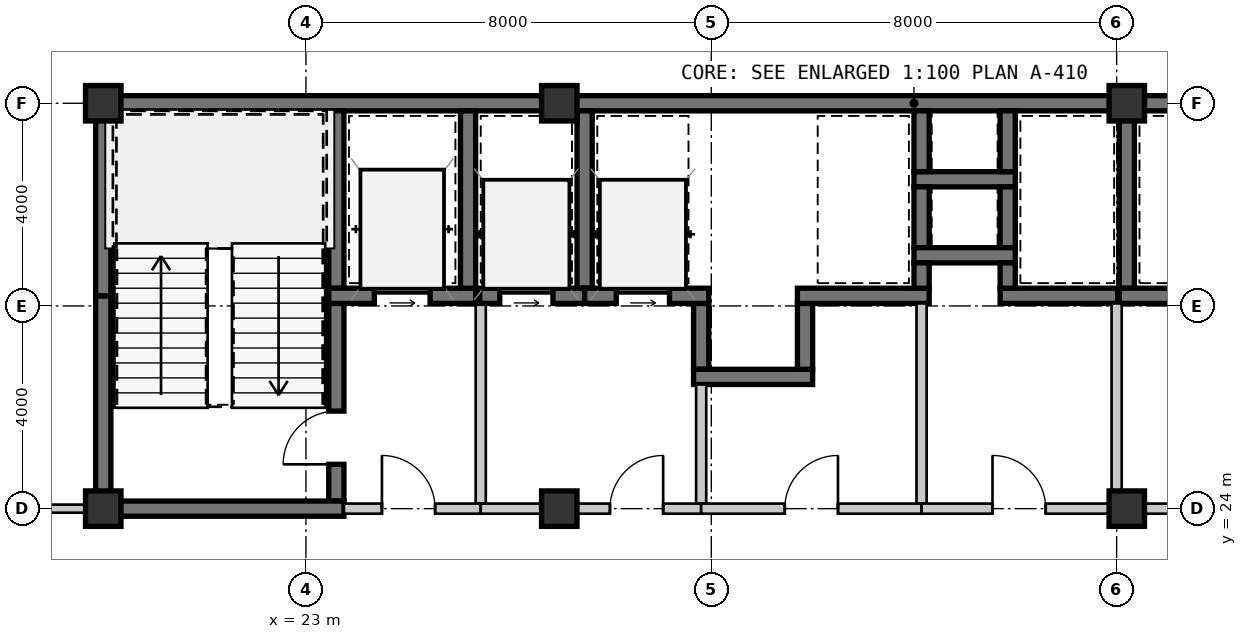
"""IFC4 building model, lengths in metres.
Left out: names, types, materials, properties, quantities, classifications, styles, units other than length and angle.
Written with IfcOpenShell. Run it as: python <this file> out.ifc"""

import sys

from ifc_helpers import new_model, si_unit, direction, frame, frame_2d, origin, origin_2d, place, context, subcontext, project, spatial, rectangle, extrude, source, transform, mapped, element, fill, save


model = new_model("IFC4")
c1 = context("Model", 3, precision=1e-05, world=origin(), true_north=direction((0.0, 1.0)))
c2 = subcontext(c1, "Body", "Model", "MODEL_VIEW")
j1 = project(units=[si_unit("LENGTHUNIT", "METRE"), si_unit("PLANEANGLEUNIT", "RADIAN")], contexts=[c1])
p1 = place(None, origin())
s1 = spatial("IfcSite", under=j1, at=p1, CompositionType="ELEMENT")
p2 = place(p1, origin())
s2 = spatial("IfcBuilding", under=s1, at=p2, CompositionType="ELEMENT")
p3 = place(p2, frame((0.0, 0.0, 74.55)))
s3 = spatial("IfcBuildingStorey", under=s2, at=p3, CompositionType="ELEMENT", Elevation=74.55)
m1 = source(origin(), c2, "Body", "SweptSolid", [
    extrude(rectangle(XDim=0.7, YDim=0.7, at=origin_2d()), origin(), (0.0, 0.0, 1.0), 3.15),
])
for number, where, z_axis, x_axis in (
    (1, (19.0, 24.0, 0.0), (0.0, 0.0, 1.0), (1.0, 0.0, 0.0)),
    (2, (28.0, 24.0, 0.0), (0.0, 0.0, 1.0), (1.0, 0.0, 0.0)),
    (3, (39.2, 24.0, 0.0), (0.0, 0.0, 1.0), (1.0, 0.0, 0.0)),
    (4, (19.0, 32.0, 0.0), (0.0, 0.0, 1.0), (1.0, 0.0, 0.0)),
    (5, (28.0, 32.0, 0.0), (0.0, 0.0, 1.0), (1.0, 0.0, 0.0)),
    (6, (39.2, 32.0, 0.0), (0.0, 0.0, 1.0), (1.0, 0.0, 0.0)),
):
    element("IfcColumn", number, at=place(p3, frame(where, z_axis=z_axis, x_axis=x_axis)), inside=s3, PredefinedType="COLUMN", context=c2, shape_type="MappedRepresentation", body=[
        mapped(m1, transform((0.0, 0.0, 0.0), scale=1.0)),
    ])
m2 = source(origin(), c2, "Body", "SweptSolid", [
    extrude(rectangle(XDim=9.15, YDim=0.3, at=frame_2d((4.575, 0.0))), origin(), (0.0, 0.0, 1.0), 2.93),
])
p4 = place(p3, frame((18.85, 32.0, 0.0), z_axis=(0.0, 0.0, 1.0), x_axis=(1.0, 0.0, 0.0)))
e7 = element("IfcWall", 7, at=p4, inside=s3, PredefinedType="SHEAR", context=c2, shape_type="MappedRepresentation", body=[
    mapped(m2, transform((0.0, 0.0, 0.0), scale=1.0)),
])
m3 = source(origin(), c2, "Body", "SweptSolid", [
    extrude(rectangle(XDim=11.2, YDim=0.3, at=frame_2d((5.6, 0.0))), origin(), (0.0, 0.0, 1.0), 2.93),
])
p5 = place(p3, frame((28.0, 32.0, 0.0), z_axis=(0.0, 0.0, 1.0), x_axis=(1.0, 0.0, 0.0)))
e8 = element("IfcWall", 8, at=p5, inside=s3, PredefinedType="SHEAR", context=c2, shape_type="MappedRepresentation", body=[
    mapped(m3, transform((0.0, 0.0, 0.0), scale=1.0)),
])
m4 = source(origin(), c2, "Body", "SweptSolid", [
    extrude(rectangle(XDim=11.95, YDim=0.3, at=frame_2d((5.975, 0.0))), origin(), (0.0, 0.0, 1.0), 2.93),
])
p6 = place(p3, frame((39.2, 32.0, 0.0), z_axis=(0.0, 0.0, 1.0), x_axis=(1.0, 0.0, 0.0)))
e9 = element("IfcWall", 9, at=p6, inside=s3, PredefinedType="SHEAR", context=c2, shape_type="MappedRepresentation", body=[
    mapped(m4, transform((0.0, 0.0, 0.0), scale=1.0)),
])
m5 = source(origin(), c2, "Body", "SweptSolid", [
    extrude(rectangle(XDim=4.05, YDim=0.3, at=frame_2d((2.025, 0.0))), origin(), (0.0, 0.0, 1.0), 2.93),
])
p7 = place(p3, frame((19.0, 24.15, 0.0), z_axis=(0.0, 0.0, 1.0), x_axis=(0.0, 1.0, 0.0)))
e10 = element("IfcWall", 10, at=p7, inside=s3, PredefinedType="SHEAR", context=c2, shape_type="MappedRepresentation", body=[
    mapped(m5, transform((0.0, 0.0, 0.0), scale=1.0)),
])
m6 = source(origin(), c2, "Body", "SweptSolid", [
    extrude(rectangle(XDim=3.65, YDim=0.3, at=frame_2d((1.825, 0.0))), origin(), (0.0, 0.0, 1.0), 2.93),
])
p8 = place(p3, frame((19.0, 28.2, 0.0), z_axis=(0.0, 0.0, 1.0), x_axis=(0.0, 1.0, 0.0)))
e11 = element("IfcWall", 11, at=p8, inside=s3, PredefinedType="SHEAR", context=c2, shape_type="MappedRepresentation", body=[
    mapped(m6, transform((0.0, 0.0, 0.0), scale=1.0)),
])
m7 = source(origin(), c2, "Body", "SweptSolid", [
    extrude(rectangle(XDim=3.5, YDim=0.3, at=frame_2d((1.75, 0.0))), origin(), (0.0, 0.0, 1.0), 2.93),
])
p9 = place(p3, frame((23.6, 28.35, 0.0), z_axis=(0.0, 0.0, 1.0), x_axis=(0.0, 1.0, 0.0)))
e12 = element("IfcWall", 12, at=p9, inside=s3, PredefinedType="SHEAR", context=c2, shape_type="MappedRepresentation", body=[
    mapped(m7, transform((0.0, 0.0, 0.0), scale=1.0)),
])
m8 = source(origin(), c2, "Body", "SweptSolid", [
    extrude(rectangle(XDim=3.9, YDim=0.3, at=frame_2d((1.95, 0.0))), origin(), (0.0, 0.0, 1.0), 2.93),
])
p10 = place(p3, frame((23.6, 24.15, 0.0), z_axis=(0.0, 0.0, 1.0), x_axis=(0.0, 1.0, 0.0)))
e13 = element("IfcWall", 13, at=p10, inside=s3, PredefinedType="SHEAR", context=c2, shape_type="MappedRepresentation", body=[
    mapped(m8, transform((0.0, 0.0, 0.0), scale=1.0)),
])
m9 = source(origin(), c2, "Body", "SweptSolid", [
    extrude(rectangle(XDim=1.05, YDim=2.1, at=frame_2d((0.525, 1.05))), frame((0.0, 0.16, 0.0), z_axis=(0.0, -1.0, 0.0), x_axis=(1.0, 0.0, 0.0)), (0.0, 0.0, 1.0), 0.32),
])
p11 = place(p10, frame((0.725, 0.0, 0.0)))
e14 = element("IfcOpeningElement", 14, at=p11, cuts=e13, PredefinedType="OPENING", context=c2, shape_type="MappedRepresentation", body=[
    mapped(m9, transform((0.0, 0.0, 0.0), scale=1.0)),
])
m10 = source(origin(), c2, "Body", "SweptSolid", [
    extrude(rectangle(XDim=4.9, YDim=0.3, at=frame_2d((2.45, 0.0))), origin(), (0.0, 0.0, 1.0), 2.93),
])
p12 = place(p3, frame((18.85, 24.0, 0.0), z_axis=(0.0, 0.0, 1.0), x_axis=(1.0, 0.0, 0.0)))
e15 = element("IfcWall", 15, at=p12, inside=s3, PredefinedType="SHEAR", context=c2, shape_type="MappedRepresentation", body=[
    mapped(m10, transform((0.0, 0.0, 0.0), scale=1.0)),
])
m11 = source(origin(), c2, "Body", "SweptSolid", [
    extrude(rectangle(XDim=2.9, YDim=0.3, at=frame_2d((1.45, 0.0))), origin(), (0.0, 0.0, 1.0), 2.93),
])
p13 = place(p3, frame((23.45, 28.2, 0.0), z_axis=(0.0, 0.0, 1.0), x_axis=(1.0, 0.0, 0.0)))
e16 = element("IfcWall", 16, at=p13, inside=s3, PredefinedType="SHEAR", context=c2, shape_type="MappedRepresentation", body=[
    mapped(m11, transform((0.0, 0.0, 0.0), scale=1.0)),
])
m12 = source(origin(), c2, "Body", "SweptSolid", [
    extrude(rectangle(XDim=1.1, YDim=2.15, at=frame_2d((0.55, 1.075))), frame((0.0, 0.16, 0.0), z_axis=(0.0, -1.0, 0.0), x_axis=(1.0, 0.0, 0.0)), (0.0, 0.0, 1.0), 0.32),
])
p14 = place(p13, frame((0.9, 0.0, 0.0)))
e17 = element("IfcOpeningElement", 17, at=p14, cuts=e16, PredefinedType="OPENING", context=c2, shape_type="MappedRepresentation", body=[
    mapped(m12, transform((0.0, 0.0, 0.0), scale=1.0)),
])
p15 = place(p3, frame((26.2, 28.35, 0.0), z_axis=(0.0, 0.0, 1.0), x_axis=(0.0, 1.0, 0.0)))
e18 = element("IfcWall", 18, at=p15, inside=s3, PredefinedType="SHEAR", context=c2, shape_type="MappedRepresentation", body=[
    mapped(m7, transform((0.0, 0.0, 0.0), scale=1.0)),
])
m13 = source(origin(), c2, "Body", "SweptSolid", [
    extrude(rectangle(XDim=3.95, YDim=0.2, at=frame_2d((1.975, 0.0))), origin(), (0.0, 0.0, 1.0), 2.93),
])
p16 = place(p3, frame((26.45, 24.1, 0.0), z_axis=(0.0, 0.0, 1.0), x_axis=(0.0, 1.0, 0.0)))
e19 = element("IfcWall", 19, at=p16, inside=s3, PredefinedType="SOLIDWALL", context=c2, shape_type="MappedRepresentation", body=[
    mapped(m13, transform((0.0, 0.0, 0.0), scale=1.0)),
])
m14 = source(origin(), c2, "Body", "SweptSolid", [
    extrude(rectangle(XDim=2.7, YDim=0.2, at=frame_2d((1.35, 0.0))), origin(), (0.0, 0.0, 1.0), 2.47),
])
p17 = place(p3, frame((23.75, 24.0, 0.0), z_axis=(0.0, 0.0, 1.0), x_axis=(1.0, 0.0, 0.0)))
e20 = element("IfcWall", 20, at=p17, inside=s3, PredefinedType="SOLIDWALL", context=c2, shape_type="MappedRepresentation", body=[
    mapped(m14, transform((0.0, 0.0, 0.0), scale=1.0)),
])
m15 = source(origin(), c2, "Body", "SweptSolid", [
    extrude(rectangle(XDim=1.05, YDim=2.1, at=frame_2d((0.525, 1.05))), frame((0.0, 0.11, 0.0), z_axis=(0.0, -1.0, 0.0), x_axis=(1.0, 0.0, 0.0)), (0.0, 0.0, 1.0), 0.22),
])
p18 = place(p17, frame((0.75, 0.0, 0.0)))
e21 = element("IfcOpeningElement", 21, at=p18, cuts=e20, PredefinedType="OPENING", context=c2, shape_type="MappedRepresentation", body=[
    mapped(m15, transform((0.0, 0.0, 0.0), scale=1.0)),
])
m16 = source(origin(), c2, "Body", "SweptSolid", [
    extrude(rectangle(XDim=2.0, YDim=0.3, at=frame_2d((1.0, 0.0))), origin(), (0.0, 0.0, 1.0), 2.93),
])
p19 = place(p3, frame((35.0, 30.5, 0.0), z_axis=(0.0, 0.0, 1.0), x_axis=(1.0, 0.0, 0.0)))
e22 = element("IfcWall", 22, at=p19, inside=s3, PredefinedType="SHEAR", context=c2, shape_type="MappedRepresentation", body=[
    mapped(m16, transform((0.0, 0.0, 0.0), scale=1.0)),
])
m17 = source(origin(), c2, "Body", "SweptSolid", [
    extrude(rectangle(XDim=1.2, YDim=0.3, at=frame_2d((0.6, 0.0))), origin(), (0.0, 0.0, 1.0), 2.93),
])
for number, where, z_axis, x_axis in (
    (23, (35.15, 31.85, 0.0), (0.0, 0.0, 1.0), (0.0, -1.0, 0.0)),
    (24, (36.85, 30.65, 0.0), (0.0, 0.0, 1.0), (0.0, 1.0, 0.0)),
    (25, (35.15, 30.35, 0.0), (0.0, 0.0, 1.0), (0.0, -1.0, 0.0)),
    (26, (36.85, 29.15, 0.0), (0.0, 0.0, 1.0), (0.0, 1.0, 0.0)),
):
    element("IfcWall", number, at=place(p3, frame(where, z_axis=z_axis, x_axis=x_axis)), inside=s3, PredefinedType="SHEAR", context=c2, shape_type="MappedRepresentation", body=[
        mapped(m17, transform((0.0, 0.0, 0.0), scale=1.0)),
    ])
p20 = place(p3, frame((35.0, 29.0, 0.0), z_axis=(0.0, 0.0, 1.0), x_axis=(1.0, 0.0, 0.0)))
e27 = element("IfcWall", 27, at=p20, inside=s3, PredefinedType="SHEAR", context=c2, shape_type="MappedRepresentation", body=[
    mapped(m16, transform((0.0, 0.0, 0.0), scale=1.0)),
])
m18 = source(origin(), c2, "Body", "SweptSolid", [
    extrude(rectangle(XDim=1.3, YDim=0.3, at=frame_2d((0.65, 0.0))), origin(), (0.0, 0.0, 1.0), 2.93),
])
p21 = place(p3, frame((30.8, 28.05, 0.0), z_axis=(0.0, 0.0, 1.0), x_axis=(0.0, -1.0, 0.0)))
e28 = element("IfcWall", 28, at=p21, inside=s3, PredefinedType="SHEAR", context=c2, shape_type="MappedRepresentation", body=[
    mapped(m18, transform((0.0, 0.0, 0.0), scale=1.0)),
])
m19 = source(origin(), c2, "Body", "SweptSolid", [
    extrude(rectangle(XDim=2.35, YDim=0.3, at=frame_2d((1.175, 0.0))), origin(), (0.0, 0.0, 1.0), 2.93),
])
p22 = place(p3, frame((30.65, 26.6, 0.0), z_axis=(0.0, 0.0, 1.0), x_axis=(1.0, 0.0, 0.0)))
e29 = element("IfcWall", 29, at=p22, inside=s3, PredefinedType="SHEAR", context=c2, shape_type="MappedRepresentation", body=[
    mapped(m19, transform((0.0, 0.0, 0.0), scale=1.0)),
])
p23 = place(p3, frame((32.85, 26.75, 0.0), z_axis=(0.0, 0.0, 1.0), x_axis=(0.0, 1.0, 0.0)))
e30 = element("IfcWall", 30, at=p23, inside=s3, PredefinedType="SHEAR", context=c2, shape_type="MappedRepresentation", body=[
    mapped(m18, transform((0.0, 0.0, 0.0), scale=1.0)),
])
p24 = place(p3, frame((28.5, 28.35, 0.0), z_axis=(0.0, 0.0, 1.0), x_axis=(0.0, 1.0, 0.0)))
e31 = element("IfcWall", 31, at=p24, inside=s3, PredefinedType="SHEAR", context=c2, shape_type="MappedRepresentation", body=[
    mapped(m7, transform((0.0, 0.0, 0.0), scale=1.0)),
])
m20 = source(origin(), c2, "Body", "SweptSolid", [
    extrude(rectangle(XDim=2.07, YDim=0.3, at=frame_2d((1.035, 0.0))), origin(), (0.0, 0.0, 1.0), 2.93),
])
p25 = place(p3, frame((26.43, 28.2, 0.0), z_axis=(0.0, 0.0, 1.0), x_axis=(1.0, 0.0, 0.0)))
e32 = element("IfcWall", 32, at=p25, inside=s3, PredefinedType="SHEAR", context=c2, shape_type="MappedRepresentation", body=[
    mapped(m20, transform((0.0, 0.0, 0.0), scale=1.0)),
])
m21 = source(origin(), c2, "Body", "SweptSolid", [
    extrude(rectangle(XDim=1.05, YDim=2.15, at=frame_2d((0.525, 1.075))), frame((0.0, 0.16, 0.0), z_axis=(0.0, -1.0, 0.0), x_axis=(1.0, 0.0, 0.0)), (0.0, 0.0, 1.0), 0.32),
])
p26 = place(p25, frame((0.395, 0.0, 0.0)))
e33 = element("IfcOpeningElement", 33, at=p26, cuts=e32, PredefinedType="OPENING", context=c2, shape_type="MappedRepresentation", body=[
    mapped(m21, transform((0.0, 0.0, 0.0), scale=1.0)),
])
m22 = source(origin(), c2, "Body", "SweptSolid", [
    extrude(rectangle(XDim=2.45, YDim=0.3, at=frame_2d((1.225, 0.0))), origin(), (0.0, 0.0, 1.0), 2.93),
])
p27 = place(p3, frame((28.5, 28.2, 0.0), z_axis=(0.0, 0.0, 1.0), x_axis=(1.0, 0.0, 0.0)))
e34 = element("IfcWall", 34, at=p27, inside=s3, PredefinedType="SHEAR", context=c2, shape_type="MappedRepresentation", body=[
    mapped(m22, transform((0.0, 0.0, 0.0), scale=1.0)),
])
p28 = place(p27, frame((0.625, 0.0, 0.0)))
e35 = element("IfcOpeningElement", 35, at=p28, cuts=e34, PredefinedType="OPENING", context=c2, shape_type="MappedRepresentation", body=[
    mapped(m21, transform((0.0, 0.0, 0.0), scale=1.0)),
])
m23 = source(origin(), c2, "Body", "SweptSolid", [
    extrude(rectangle(XDim=2.35, YDim=0.2, at=frame_2d((1.175, 0.0))), origin(), (0.0, 0.0, 1.0), 2.93),
])
p29 = place(p3, frame((30.8, 26.45, 0.0), z_axis=(0.0, 0.0, 1.0), x_axis=(0.0, -1.0, 0.0)))
e36 = element("IfcWall", 36, at=p29, inside=s3, PredefinedType="SOLIDWALL", context=c2, shape_type="MappedRepresentation", body=[
    mapped(m23, transform((0.0, 0.0, 0.0), scale=1.0)),
])
m24 = source(origin(), c2, "Body", "SweptSolid", [
    extrude(rectangle(XDim=4.35, YDim=0.2, at=frame_2d((2.175, 0.0))), origin(), (0.0, 0.0, 1.0), 2.47),
])
p30 = place(p3, frame((30.8, 24.0, 0.0), z_axis=(0.0, 0.0, 1.0), x_axis=(-1.0, 0.0, 0.0)))
e37 = element("IfcWall", 37, at=p30, inside=s3, PredefinedType="SOLIDWALL", context=c2, shape_type="MappedRepresentation", body=[
    mapped(m24, transform((0.0, 0.0, 0.0), scale=1.0)),
])
p31 = place(p30, frame((0.75, 0.0, 0.0)))
e38 = element("IfcOpeningElement", 38, at=p31, cuts=e37, PredefinedType="OPENING", context=c2, shape_type="MappedRepresentation", body=[
    mapped(m15, transform((0.0, 0.0, 0.0), scale=1.0)),
])
m25 = source(origin(), c2, "Body", "SweptSolid", [
    extrude(rectangle(XDim=2.6, YDim=0.3, at=frame_2d((1.3, 0.0))), origin(), (0.0, 0.0, 1.0), 2.93),
])
p32 = place(p3, frame((32.7, 28.2, 0.0), z_axis=(0.0, 0.0, 1.0), x_axis=(1.0, 0.0, 0.0)))
e39 = element("IfcWall", 39, at=p32, inside=s3, PredefinedType="SHEAR", context=c2, shape_type="MappedRepresentation", body=[
    mapped(m25, transform((0.0, 0.0, 0.0), scale=1.0)),
])
m26 = source(origin(), c2, "Body", "SweptSolid", [
    extrude(rectangle(XDim=0.5, YDim=0.3, at=frame_2d((0.25, 0.0))), origin(), (0.0, 0.0, 1.0), 2.93),
])
p33 = place(p3, frame((35.15, 28.35, 0.0), z_axis=(0.0, 0.0, 1.0), x_axis=(0.0, 1.0, 0.0)))
e40 = element("IfcWall", 40, at=p33, inside=s3, PredefinedType="SHEAR", context=c2, shape_type="MappedRepresentation", body=[
    mapped(m26, transform((0.0, 0.0, 0.0), scale=1.0)),
])
p34 = place(p3, frame((39.2, 28.35, 0.0), z_axis=(0.0, 0.0, 1.0), x_axis=(0.0, 1.0, 0.0)))
e41 = element("IfcWall", 41, at=p34, inside=s3, PredefinedType="SHEAR", context=c2, shape_type="MappedRepresentation", body=[
    mapped(m7, transform((0.0, 0.0, 0.0), scale=1.0)),
])
m27 = source(origin(), c2, "Body", "SweptSolid", [
    extrude(rectangle(XDim=2.32, YDim=0.3, at=frame_2d((1.16, 0.0))), origin(), (0.0, 0.0, 1.0), 2.93),
])
p35 = place(p3, frame((36.7, 28.2, 0.0), z_axis=(0.0, 0.0, 1.0), x_axis=(1.0, 0.0, 0.0)))
e42 = element("IfcWall", 42, at=p35, inside=s3, PredefinedType="SHEAR", context=c2, shape_type="MappedRepresentation", body=[
    mapped(m27, transform((0.0, 0.0, 0.0), scale=1.0)),
])
p36 = place(p3, frame((36.85, 28.85, 0.0), z_axis=(0.0, 0.0, 1.0), x_axis=(0.0, -1.0, 0.0)))
e43 = element("IfcWall", 43, at=p36, inside=s3, PredefinedType="SHEAR", context=c2, shape_type="MappedRepresentation", body=[
    mapped(m26, transform((0.0, 0.0, 0.0), scale=1.0)),
])
m28 = source(origin(), c2, "Body", "SweptSolid", [
    extrude(rectangle(XDim=1.17, YDim=0.3, at=frame_2d((0.585, 0.0))), origin(), (0.0, 0.0, 1.0), 2.93),
])
p37 = place(p3, frame((39.05, 28.2, 0.0), z_axis=(0.0, 0.0, 1.0), x_axis=(1.0, 0.0, 0.0)))
e44 = element("IfcWall", 44, at=p37, inside=s3, PredefinedType="SHEAR", context=c2, shape_type="MappedRepresentation", body=[
    mapped(m28, transform((0.0, 0.0, 0.0), scale=1.0)),
])
p38 = place(p3, frame((35.15, 28.05, 0.0), z_axis=(0.0, 0.0, 1.0), x_axis=(0.0, -1.0, 0.0)))
e45 = element("IfcWall", 45, at=p38, inside=s3, PredefinedType="SOLIDWALL", context=c2, shape_type="MappedRepresentation", body=[
    mapped(m13, transform((0.0, 0.0, 0.0), scale=1.0)),
])
m29 = source(origin(), c2, "Body", "SweptSolid", [
    extrude(rectangle(XDim=4.35, YDim=0.2, at=frame_2d((2.175, 0.0))), origin(), (0.0, 0.0, 1.0), 2.47),
])
p39 = place(p3, frame((35.15, 24.0, 0.0), z_axis=(0.0, 0.0, 1.0), x_axis=(-1.0, 0.0, 0.0)))
e46 = element("IfcWall", 46, at=p39, inside=s3, PredefinedType="SOLIDWALL", context=c2, shape_type="MappedRepresentation", body=[
    mapped(m29, transform((0.0, 0.0, 0.0), scale=1.0)),
])
p40 = place(p39, frame((1.65, 0.0, 0.0)))
e47 = element("IfcOpeningElement", 47, at=p40, cuts=e46, PredefinedType="OPENING", context=c2, shape_type="MappedRepresentation", body=[
    mapped(m15, transform((0.0, 0.0, 0.0), scale=1.0)),
])
p41 = place(p3, frame((39.0, 28.05, 0.0), z_axis=(0.0, 0.0, 1.0), x_axis=(0.0, -1.0, 0.0)))
e48 = element("IfcWall", 48, at=p41, inside=s3, PredefinedType="SOLIDWALL", context=c2, shape_type="MappedRepresentation", body=[
    mapped(m13, transform((0.0, 0.0, 0.0), scale=1.0)),
])
m30 = source(origin(), c2, "Body", "SweptSolid", [
    extrude(rectangle(XDim=3.85, YDim=0.2, at=frame_2d((1.925, 0.0))), origin(), (0.0, 0.0, 1.0), 2.47),
])
p42 = place(p3, frame((39.0, 24.0, 0.0), z_axis=(0.0, 0.0, 1.0), x_axis=(-1.0, 0.0, 0.0)))
e49 = element("IfcWall", 49, at=p42, inside=s3, PredefinedType="SOLIDWALL", context=c2, shape_type="MappedRepresentation", body=[
    mapped(m30, transform((0.0, 0.0, 0.0), scale=1.0)),
])
p43 = place(p42, frame((1.4, 0.0, 0.0)))
e50 = element("IfcOpeningElement", 50, at=p43, cuts=e49, PredefinedType="OPENING", context=c2, shape_type="MappedRepresentation", body=[
    mapped(m15, transform((0.0, 0.0, 0.0), scale=1.0)),
])
m31 = source(origin(), c2, "Body", "SweptSolid", [
    extrude(rectangle(XDim=4.55, YDim=0.2, at=frame_2d((2.275, 0.0))), origin(), (0.0, 0.0, 1.0), 2.397),
])
p44 = place(p3, frame((43.55, 24.0, 0.0), z_axis=(0.0, 0.0, 1.0), x_axis=(-1.0, 0.0, 0.0)))
e51 = element("IfcWall", 51, at=p44, inside=s3, PredefinedType="SOLIDWALL", context=c2, shape_type="MappedRepresentation", body=[
    mapped(m31, transform((0.0, 0.0, 0.0), scale=1.0)),
])
p45 = place(p44, frame((1.75, 0.0, 0.0)))
e52 = element("IfcOpeningElement", 52, at=p45, cuts=e51, PredefinedType="OPENING", context=c2, shape_type="MappedRepresentation", body=[
    mapped(m15, transform((0.0, 0.0, 0.0), scale=1.0)),
])
m32 = source(origin(), c2, "Body", "SweptSolid", [
    extrude(rectangle(XDim=4.17, YDim=0.16, at=frame_2d((2.085, 0.0))), origin(), (0.0, 0.0, 1.0), 2.93),
])
p46 = place(p3, frame((14.68, 24.0, 0.0), z_axis=(0.0, 0.0, 1.0), x_axis=(1.0, 0.0, 0.0)))
e53 = element("IfcWall", 53, at=p46, inside=s3, PredefinedType="PARTITIONING", context=c2, shape_type="MappedRepresentation", body=[
    mapped(m32, transform((0.0, 0.0, 0.0), scale=1.0)),
])
m33 = source(origin(), c2, "Body", "SweptSolid", [
    extrude(rectangle(XDim=0.92, YDim=2.1, at=frame_2d((0.46, 1.05))), frame((0.0, 0.09, 0.0), z_axis=(0.0, -1.0, 0.0), x_axis=(1.0, 0.0, 0.0)), (0.0, 0.0, 1.0), 0.18),
])
p47 = place(p46, frame((1.69, 0.0, 0.0)))
e54 = element("IfcOpeningElement", 54, at=p47, cuts=e53, PredefinedType="OPENING", context=c2, shape_type="MappedRepresentation", body=[
    mapped(m33, transform((0.0, 0.0, 0.0), scale=1.0)),
])
m34 = source(origin(), c2, "Body", "SweptSolid", [
    extrude(rectangle(XDim=1.05, YDim=2.1, at=frame_2d((0.525, 1.05))), frame((0.0, 0.025, 0.0), z_axis=(0.0, -1.0, 0.0), x_axis=(1.0, 0.0, 0.0)), (0.0, 0.0, 1.0), 0.05),
])
p48 = place(p11, origin())
e55 = element("IfcDoor", 55, at=p48, inside=s3, OperationType="SINGLE_SWING_LEFT", PredefinedType="DOOR", context=c2, shape_type="MappedRepresentation", body=[
    mapped(m34, transform((0.0, 0.0, 0.0), scale=1.0)),
])
fill(e14, e55)
m35 = source(origin(), c2, "Body", "SweptSolid", [
    extrude(rectangle(XDim=1.1, YDim=2.15, at=frame_2d((0.55, 1.075))), frame((0.0, 0.025, 0.0), z_axis=(0.0, -1.0, 0.0), x_axis=(1.0, 0.0, 0.0)), (0.0, 0.0, 1.0), 0.05),
])
p49 = place(p14, origin())
e56 = element("IfcDoor", 56, at=p49, inside=s3, OperationType="SLIDING_TO_LEFT", PredefinedType="DOOR", context=c2, shape_type="MappedRepresentation", body=[
    mapped(m35, transform((0.0, 0.0, 0.0), scale=1.0)),
])
fill(e17, e56)
p50 = place(p18, origin())
e57 = element("IfcDoor", 57, at=p50, inside=s3, OperationType="SINGLE_SWING_LEFT", PredefinedType="DOOR", context=c2, shape_type="MappedRepresentation", body=[
    mapped(m34, transform((0.0, 0.0, 0.0), scale=1.0)),
])
fill(e21, e57)
m36 = source(origin(), c2, "Body", "SweptSolid", [
    extrude(rectangle(XDim=1.05, YDim=2.15, at=frame_2d((0.525, 1.075))), frame((0.0, 0.025, 0.0), z_axis=(0.0, -1.0, 0.0), x_axis=(1.0, 0.0, 0.0)), (0.0, 0.0, 1.0), 0.05),
])
p51 = place(p26, origin())
e58 = element("IfcDoor", 58, at=p51, inside=s3, OperationType="SLIDING_TO_LEFT", PredefinedType="DOOR", context=c2, shape_type="MappedRepresentation", body=[
    mapped(m36, transform((0.0, 0.0, 0.0), scale=1.0)),
])
fill(e33, e58)
p52 = place(p28, origin())
e59 = element("IfcDoor", 59, at=p52, inside=s3, OperationType="SLIDING_TO_LEFT", PredefinedType="DOOR", context=c2, shape_type="MappedRepresentation", body=[
    mapped(m36, transform((0.0, 0.0, 0.0), scale=1.0)),
])
fill(e35, e59)
p53 = place(p31, frame((1.05, 0.0, 0.0), z_axis=(0.0, 0.0, 1.0), x_axis=(-1.0, 0.0, 0.0)))
e60 = element("IfcDoor", 60, at=p53, inside=s3, OperationType="SINGLE_SWING_RIGHT", PredefinedType="DOOR", context=c2, shape_type="MappedRepresentation", body=[
    mapped(m34, transform((0.0, 0.0, 0.0), scale=1.0)),
])
fill(e38, e60)
p54 = place(p40, frame((1.05, 0.0, 0.0), z_axis=(0.0, 0.0, 1.0), x_axis=(-1.0, 0.0, 0.0)))
e61 = element("IfcDoor", 61, at=p54, inside=s3, OperationType="SINGLE_SWING_RIGHT", PredefinedType="DOOR", context=c2, shape_type="MappedRepresentation", body=[
    mapped(m34, transform((0.0, 0.0, 0.0), scale=1.0)),
])
fill(e47, e61)
p55 = place(p43, frame((1.05, 0.0, 0.0), z_axis=(0.0, 0.0, 1.0), x_axis=(-1.0, 0.0, 0.0)))
e62 = element("IfcDoor", 62, at=p55, inside=s3, OperationType="SINGLE_SWING_LEFT", PredefinedType="DOOR", context=c2, shape_type="MappedRepresentation", body=[
    mapped(m34, transform((0.0, 0.0, 0.0), scale=1.0)),
])
fill(e50, e62)
save(model, sys.argv[1])
